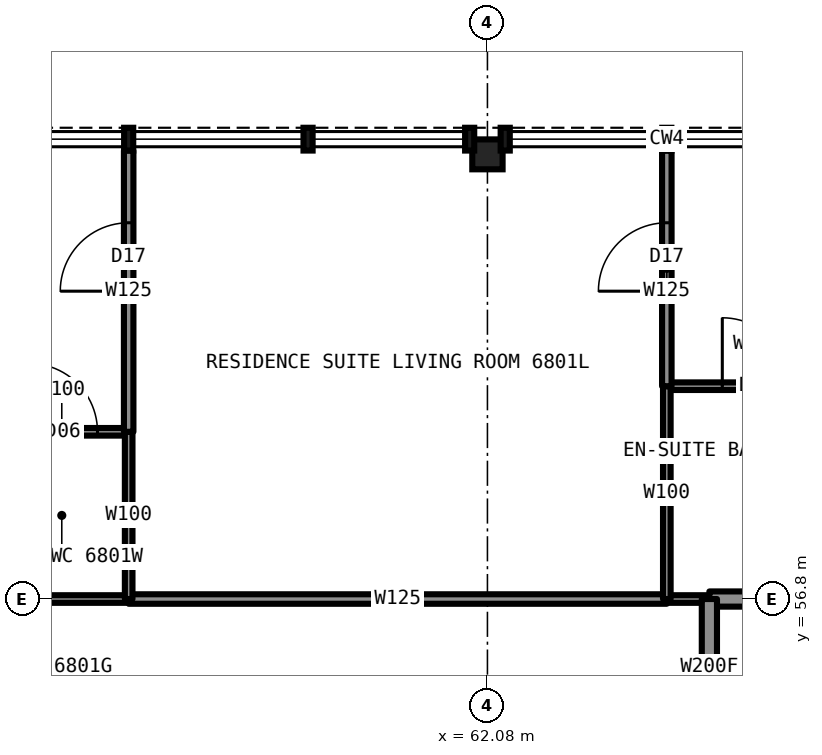
"""IFC4 building model, lengths in metres.
Left out: names, types, materials, properties, quantities, classifications, styles, units other than length and angle.
Written with IfcOpenShell. Run it as: python <this file> out.ifc"""

import sys

from ifc_helpers import new_model, si_unit, direction, frame, frame_2d, origin, origin_2d, place, context, subcontext, project, spatial, rectangle, i_section, extrude, element, fill, save


model = new_model("IFC4")
c1 = context("Model", 3, precision=1e-05, world=origin(), true_north=direction((0.0, 1.0)))
c2 = subcontext(c1, "Body", "Model", "MODEL_VIEW")
j1 = project(units=[si_unit("LENGTHUNIT", "METRE"), si_unit("PLANEANGLEUNIT", "RADIAN")], contexts=[c1])
p1 = place(None, origin())
s1 = spatial("IfcSite", under=j1, at=p1, CompositionType="ELEMENT")
p2 = place(p1, origin())
s2 = spatial("IfcBuilding", under=s1, at=p2, CompositionType="ELEMENT")
p3 = place(p2, frame((0.0, 0.0, 247.7)))
s3 = spatial("IfcBuildingStorey", under=s2, at=p3, CompositionType="ELEMENT", Elevation=247.7)
p4 = place(p3, frame((62.08, 62.65, 0.0), z_axis=(0.0, 0.0, 1.0), x_axis=(1.0, 0.0, 0.0)))
e1 = element("IfcColumn", 1, at=p4, inside=s3, PredefinedType="COLUMN", context=c2, shape_type="SweptSolid", body=[
    extrude(i_section(OverallWidth=0.399, OverallDepth=0.394, WebThickness=0.023, FlangeThickness=0.037, at=origin_2d()), origin(), (0.0, 0.0, 1.0), 3.5),
])
p5 = place(p3, frame((52.64, 56.8, 0.0), z_axis=(0.0, 0.0, 1.0), x_axis=(1.0, 0.0, 0.0)))
e2 = element("IfcWall", 2, at=p5, inside=s3, PredefinedType="PARTITIONING", context=c2, shape_type="SweptSolid", body=[
    extrude(rectangle(XDim=4.72, YDim=0.1, at=frame_2d((2.36, 0.0))), origin(), (0.0, 0.0, 1.0), 3.33),
])
p6 = place(p3, frame((64.44, 56.8, 0.0), z_axis=(0.0, 0.0, 1.0), x_axis=(1.0, 0.0, 0.0)))
e3 = element("IfcWall", 3, at=p6, inside=s3, PredefinedType="PARTITIONING", context=c2, shape_type="SweptSolid", body=[
    extrude(rectangle(XDim=0.56, YDim=0.1, at=frame_2d((0.28, 0.0))), origin(), (0.0, 0.0, 1.0), 3.33),
])
p7 = place(p3, frame((65.0, 56.8, 0.0), z_axis=(0.0, 0.0, 1.0), x_axis=(1.0, 0.0, 0.0)))
e4 = element("IfcWall", 4, at=p7, inside=s3, PredefinedType="PARTITIONING", context=c2, shape_type="SweptSolid", body=[
    extrude(rectangle(XDim=1.78, YDim=0.2, at=frame_2d((0.89, 0.0))), origin(), (0.0, 0.0, 1.0), 3.33),
])
p8 = place(p3, frame((57.36, 56.8, 0.0), z_axis=(0.0, 0.0, 1.0), x_axis=(1.0, 0.0, 0.0)))
e5 = element("IfcWall", 5, at=p8, inside=s3, PredefinedType="PARTITIONING", context=c2, shape_type="SweptSolid", body=[
    extrude(rectangle(XDim=7.08, YDim=0.125, at=frame_2d((3.54, 0.0))), origin(), (0.0, 0.0, 1.0), 3.33),
])
p9 = place(p3, frame((55.6, 59.0, 0.0), z_axis=(0.0, 0.0, 1.0), x_axis=(1.0, 0.0, 0.0)))
e6 = element("IfcWall", 6, at=p9, inside=s3, PredefinedType="PARTITIONING", context=c2, shape_type="SweptSolid", body=[
    extrude(rectangle(XDim=1.76, YDim=0.1, at=frame_2d((0.88, 0.0))), origin(), (0.0, 0.0, 1.0), 3.33),
])
p10 = place(p9, frame((0.45, 0.0, 0.0)))
e7 = element("IfcOpeningElement", 7, at=p10, cuts=e6, PredefinedType="OPENING", context=c2, shape_type="SweptSolid", body=[
    extrude(rectangle(XDim=0.9, YDim=2.1, at=frame_2d((0.45, 1.05))), frame((0.0, 0.06, 0.0), z_axis=(0.0, -1.0, 0.0), x_axis=(1.0, 0.0, 0.0)), (0.0, 0.0, 1.0), 0.12),
])
p11 = place(p3, frame((64.44, 59.6, 0.0), z_axis=(0.0, 0.0, 1.0), x_axis=(1.0, 0.0, 0.0)))
e8 = element("IfcWall", 8, at=p11, inside=s3, PredefinedType="PARTITIONING", context=c2, shape_type="SweptSolid", body=[
    extrude(rectangle(XDim=2.36, YDim=0.1, at=frame_2d((1.18, 0.0))), origin(), (0.0, 0.0, 1.0), 3.33),
])
p12 = place(p11, frame((0.73, 0.0, 0.0)))
e9 = element("IfcOpeningElement", 9, at=p12, cuts=e8, PredefinedType="OPENING", context=c2, shape_type="SweptSolid", body=[
    extrude(rectangle(XDim=0.9, YDim=2.1, at=frame_2d((0.45, 1.05))), frame((0.0, 0.06, 0.0), z_axis=(0.0, -1.0, 0.0), x_axis=(1.0, 0.0, 0.0)), (0.0, 0.0, 1.0), 0.12),
])
p13 = place(p3, frame((65.0, 55.0, 0.0), z_axis=(0.0, 0.0, 1.0), x_axis=(0.0, 1.0, 0.0)))
e10 = element("IfcWall", 10, at=p13, inside=s3, PredefinedType="PARTITIONING", context=c2, shape_type="SweptSolid", body=[
    extrude(rectangle(XDim=1.8, YDim=0.2, at=frame_2d((0.9, 0.0))), origin(), (0.0, 0.0, 1.0), 3.33),
])
p14 = place(p3, frame((57.36, 56.8, 0.0), z_axis=(0.0, 0.0, 1.0), x_axis=(0.0, 1.0, 0.0)))
e11 = element("IfcWall", 11, at=p14, inside=s3, PredefinedType="PARTITIONING", context=c2, shape_type="SweptSolid", body=[
    extrude(rectangle(XDim=2.2, YDim=0.1, at=frame_2d((1.1, 0.0))), origin(), (0.0, 0.0, 1.0), 3.33),
])
p15 = place(p3, frame((57.36, 59.0, 0.0), z_axis=(0.0, 0.0, 1.0), x_axis=(0.0, 1.0, 0.0)))
e12 = element("IfcWall", 12, at=p15, inside=s3, PredefinedType="PARTITIONING", context=c2, shape_type="SweptSolid", body=[
    extrude(rectangle(XDim=3.7, YDim=0.125, at=frame_2d((1.85, 0.0))), origin(), (0.0, 0.0, 1.0), 3.33),
])
p16 = place(p15, frame((1.85, 0.0, 0.0)))
e13 = element("IfcOpeningElement", 13, at=p16, cuts=e12, PredefinedType="OPENING", context=c2, shape_type="SweptSolid", body=[
    extrude(rectangle(XDim=0.9, YDim=2.2, at=frame_2d((0.45, 1.1))), frame((0.0, 0.073, 0.0), z_axis=(0.0, -1.0, 0.0), x_axis=(1.0, 0.0, 0.0)), (0.0, 0.0, 1.0), 0.145),
])
p17 = place(p3, frame((64.44, 56.8, 0.0), z_axis=(0.0, 0.0, 1.0), x_axis=(0.0, 1.0, 0.0)))
e14 = element("IfcWall", 14, at=p17, inside=s3, PredefinedType="PARTITIONING", context=c2, shape_type="SweptSolid", body=[
    extrude(rectangle(XDim=2.8, YDim=0.1, at=frame_2d((1.4, 0.0))), origin(), (0.0, 0.0, 1.0), 3.33),
])
p18 = place(p3, frame((64.44, 59.6, 0.0), z_axis=(0.0, 0.0, 1.0), x_axis=(0.0, 1.0, 0.0)))
e15 = element("IfcWall", 15, at=p18, inside=s3, PredefinedType="PARTITIONING", context=c2, shape_type="SweptSolid", body=[
    extrude(rectangle(XDim=3.1, YDim=0.125, at=frame_2d((1.55, 0.0))), origin(), (0.0, 0.0, 1.0), 3.33),
])
p19 = place(p18, frame((1.25, 0.0, 0.0)))
e16 = element("IfcOpeningElement", 16, at=p19, cuts=e15, PredefinedType="OPENING", context=c2, shape_type="SweptSolid", body=[
    extrude(rectangle(XDim=0.9, YDim=2.2, at=frame_2d((0.45, 1.1))), frame((0.0, 0.073, 0.0), z_axis=(0.0, -1.0, 0.0), x_axis=(1.0, 0.0, 0.0)), (0.0, 0.0, 1.0), 0.145),
])
p20 = place(p12, origin())
e17 = element("IfcDoor", 17, at=p20, inside=s3, OperationType="SINGLE_SWING_RIGHT", PredefinedType="DOOR", context=c2, shape_type="SweptSolid", body=[
    extrude(rectangle(XDim=0.9, YDim=2.1, at=frame_2d((0.45, 1.05))), frame((0.0, 0.025, 0.0), z_axis=(0.0, -1.0, 0.0), x_axis=(1.0, 0.0, 0.0)), (0.0, 0.0, 1.0), 0.05),
])
fill(e9, e17)
p21 = place(p16, origin())
e18 = element("IfcDoor", 18, at=p21, inside=s3, OperationType="SINGLE_SWING_LEFT", PredefinedType="DOOR", context=c2, shape_type="SweptSolid", body=[
    extrude(rectangle(XDim=0.9, YDim=2.2, at=frame_2d((0.45, 1.1))), frame((0.0, 0.025, 0.0), z_axis=(0.0, -1.0, 0.0), x_axis=(1.0, 0.0, 0.0)), (0.0, 0.0, 1.0), 0.05),
])
fill(e13, e18)
p22 = place(p19, origin())
e19 = element("IfcDoor", 19, at=p22, inside=s3, OperationType="SINGLE_SWING_LEFT", PredefinedType="DOOR", context=c2, shape_type="SweptSolid", body=[
    extrude(rectangle(XDim=0.9, YDim=2.2, at=frame_2d((0.45, 1.1))), frame((0.0, 0.025, 0.0), z_axis=(0.0, -1.0, 0.0), x_axis=(1.0, 0.0, 0.0)), (0.0, 0.0, 1.0), 0.05),
])
fill(e16, e19)
p23 = place(p10, origin())
e20 = element("IfcDoor", 20, at=p23, inside=s3, OperationType="SINGLE_SWING_LEFT", PredefinedType="DOOR", context=c2, shape_type="SweptSolid", body=[
    extrude(rectangle(XDim=0.9, YDim=2.1, at=frame_2d((0.45, 1.05))), frame((0.0, 0.025, 0.0), z_axis=(0.0, -1.0, 0.0), x_axis=(1.0, 0.0, 0.0)), (0.0, 0.0, 1.0), 0.05),
])
fill(e7, e20)
save(model, sys.argv[1])
